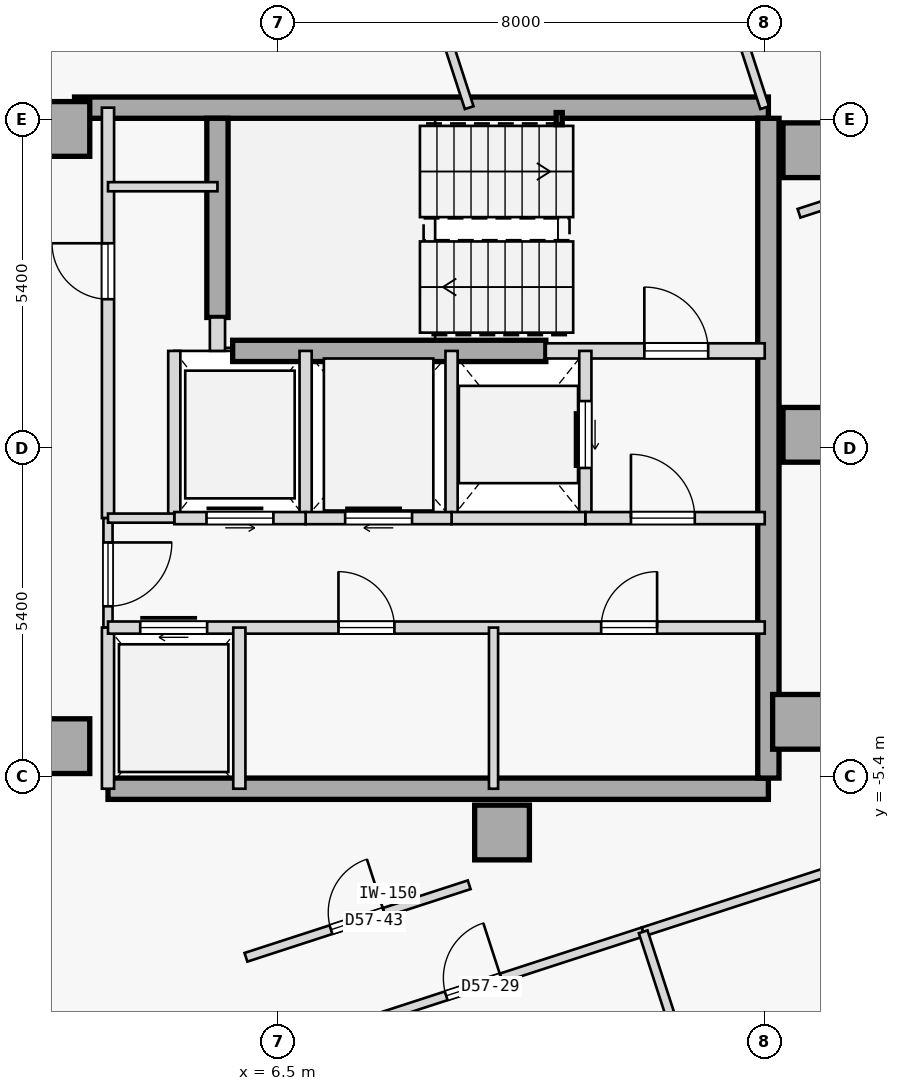
"""IFC4 building model, lengths in metres.
Left out: names, types, materials, properties, quantities, classifications, styles, units other than length and angle.
Written with IfcOpenShell. Run it as: python <this file> out.ifc"""

import sys

from ifc_helpers import new_model, si_unit, direction, frame, frame_2d, origin, origin_2d, place, context, subcontext, project, spatial, rectangle, hollow_rectangle, extrude, element, fill, save


model = new_model("IFC4")
c1 = context("Model", 3, precision=1e-05, world=origin(), true_north=direction((0.0, 1.0)))
c2 = subcontext(c1, "Body", "Model", "MODEL_VIEW")
j1 = project(units=[si_unit("LENGTHUNIT", "METRE"), si_unit("PLANEANGLEUNIT", "RADIAN")], contexts=[c1])
p1 = place(None, origin())
s1 = spatial("IfcSite", under=j1, at=p1, CompositionType="ELEMENT")
p2 = place(p1, origin())
s2 = spatial("IfcBuilding", under=s1, at=p2, CompositionType="ELEMENT")
p3 = place(p2, frame((0.0, 0.0, 217.6)))
s3 = spatial("IfcBuildingStorey", under=s2, at=p3, CompositionType="ELEMENT", Elevation=217.6)
for number, where, z_axis, x_axis in (
    (1, (15.25, 4.9, 0.0), (0.0, 0.0, 1.0), (1.0, 0.0, 0.0)),
    (2, (15.25, 0.22, 0.0), (0.0, 0.0, 1.0), (1.0, 0.0, 0.0)),
    (3, (15.08, -4.5, 0.0), (0.0, 0.0, 1.0), (1.0, 0.0, 0.0)),
    (4, (10.18, -6.32, 0.0), (0.0, 0.0, 1.0), (1.0, 0.0, 0.0)),
    (5, (2.95, -4.9, 0.0), (0.0, 0.0, 1.0), (1.0, 0.0, 0.0)),
    (6, (2.95, 5.25, 0.0), (0.0, 0.0, 1.0), (1.0, 0.0, 0.0)),
):
    element("IfcColumn", number, at=place(p3, frame(where, z_axis=z_axis, x_axis=x_axis)), inside=s3, PredefinedType="COLUMN", context=c2, shape_type="SweptSolid", body=[
        extrude(rectangle(XDim=0.9, YDim=0.9, at=origin_2d()), origin(), (0.0, 0.0, 1.0), 3.35),
    ])
p4 = place(p3, frame((3.15, 5.6, 0.0), z_axis=(0.0, 0.0, 1.0), x_axis=(1.0, 0.0, 0.0)))
e7 = element("IfcWall", 7, at=p4, inside=s3, PredefinedType="SHEAR", context=c2, shape_type="SweptSolid", body=[
    extrude(rectangle(XDim=11.41, YDim=0.35, at=frame_2d((5.705, 0.0))), origin(), (0.0, 0.0, 1.0), 3.125),
])
p5 = place(p3, frame((3.7, -5.6, 0.0), z_axis=(0.0, 0.0, 1.0), x_axis=(1.0, 0.0, 0.0)))
e8 = element("IfcWall", 8, at=p5, inside=s3, PredefinedType="SHEAR", context=c2, shape_type="SweptSolid", body=[
    extrude(rectangle(XDim=10.86, YDim=0.35, at=frame_2d((5.43, 0.0))), origin(), (0.0, 0.0, 1.0), 3.125),
])
p6 = place(p3, frame((14.56, -5.425, 0.0), z_axis=(0.0, 0.0, 1.0), x_axis=(0.0, 1.0, 0.0)))
e9 = element("IfcWall", 9, at=p6, inside=s3, PredefinedType="SHEAR", context=c2, shape_type="SweptSolid", body=[
    extrude(rectangle(XDim=10.85, YDim=0.35, at=frame_2d((5.425, 0.0))), origin(), (0.0, 0.0, 1.0), 3.125),
])
p7 = place(p3, frame((5.5, 2.15, 0.0), z_axis=(0.0, 0.0, 1.0), x_axis=(0.0, 1.0, 0.0)))
e10 = element("IfcWall", 10, at=p7, inside=s3, PredefinedType="SHEAR", context=c2, shape_type="SweptSolid", body=[
    extrude(rectangle(XDim=3.275, YDim=0.35, at=frame_2d((1.638, 0.0))), origin(), (0.0, 0.0, 1.0), 3.125),
])
p8 = place(p3, frame((5.75, 1.6, 0.0), z_axis=(0.0, 0.0, 1.0), x_axis=(1.0, 0.0, 0.0)))
e11 = element("IfcWall", 11, at=p8, inside=s3, PredefinedType="SHEAR", context=c2, shape_type="SweptSolid", body=[
    extrude(rectangle(XDim=5.15, YDim=0.35, at=frame_2d((2.575, 0.0))), origin(), (0.0, 0.0, 1.0), 3.125),
])
p9 = place(p3, frame((11.12, 5.42, 0.0), z_axis=(0.0, 0.0, 1.0), x_axis=(1.0, 0.0, 0.0)))
e12 = element("IfcColumn", 12, at=p9, inside=s3, PredefinedType="COLUMN", context=c2, shape_type="SweptSolid", body=[
    extrude(hollow_rectangle(XDim=0.1, YDim=0.2, WallThickness=0.008, at=origin_2d()), origin(), (0.0, 0.0, 1.0), 3.35),
])
p10 = place(p3, frame((10.9, 1.6, 0.0), z_axis=(0.0, 0.0, 1.0), x_axis=(1.0, 0.0, 0.0)))
e13 = element("IfcWall", 13, at=p10, inside=s3, PredefinedType="STANDARD", context=c2, shape_type="SweptSolid", body=[
    extrude(rectangle(XDim=3.6, YDim=0.25, at=frame_2d((1.8, 0.0))), origin(), (0.0, 0.0, 1.0), 3.125),
])
p11 = place(p10, frame((1.62, 0.0, 0.0)))
e14 = element("IfcOpeningElement", 14, at=p11, cuts=e13, PredefinedType="OPENING", context=c2, shape_type="SweptSolid", body=[
    extrude(rectangle(XDim=1.05, YDim=2.15, at=frame_2d((0.525, 1.075))), frame((0.0, 0.135, 0.0), z_axis=(0.0, -1.0, 0.0), x_axis=(1.0, 0.0, 0.0)), (0.0, 0.0, 1.0), 0.27),
])
p12 = place(p3, frame((5.5, 1.6, 0.0), z_axis=(0.0, 0.0, 1.0), x_axis=(0.0, 1.0, 0.0)))
e15 = element("IfcWall", 15, at=p12, inside=s3, PredefinedType="STANDARD", context=c2, shape_type="SweptSolid", body=[
    extrude(rectangle(XDim=0.55, YDim=0.25, at=frame_2d((0.275, 0.0))), origin(), (0.0, 0.0, 1.0), 3.125),
])
p13 = place(p3, frame((3.7, -1.15, 0.0), z_axis=(0.0, 0.0, 1.0), x_axis=(0.0, 1.0, 0.0)))
e16 = element("IfcWall", 16, at=p13, inside=s3, PredefinedType="STANDARD", context=c2, shape_type="SweptSolid", body=[
    extrude(rectangle(XDim=6.75, YDim=0.2, at=frame_2d((3.375, 0.0))), origin(), (0.0, 0.0, 1.0), 3.125),
])
p14 = place(p13, frame((3.6, 0.0, 0.0)))
e17 = element("IfcOpeningElement", 17, at=p14, cuts=e16, PredefinedType="OPENING", context=c2, shape_type="SweptSolid", body=[
    extrude(rectangle(XDim=0.92, YDim=2.15, at=frame_2d((0.46, 1.075))), frame((0.0, 0.11, 0.0), z_axis=(0.0, -1.0, 0.0), x_axis=(1.0, 0.0, 0.0)), (0.0, 0.0, 1.0), 0.22),
])
p15 = place(p3, frame((3.7, -2.95, 0.0), z_axis=(0.0, 0.0, 1.0), x_axis=(0.0, 1.0, 0.0)))
e18 = element("IfcWall", 18, at=p15, inside=s3, PredefinedType="PARTITIONING", context=c2, shape_type="SweptSolid", body=[
    extrude(rectangle(XDim=1.8, YDim=0.15, at=frame_2d((0.9, 0.0))), origin(), (0.0, 0.0, 1.0), 3.125),
])
p16 = place(p15, frame((0.35, 0.0, 0.0)))
e19 = element("IfcOpeningElement", 19, at=p16, cuts=e18, PredefinedType="OPENING", context=c2, shape_type="SweptSolid", body=[
    extrude(rectangle(XDim=1.05, YDim=2.18, at=frame_2d((0.525, 1.09))), frame((0.0, 0.085, 0.0), z_axis=(0.0, -1.0, 0.0), x_axis=(1.0, 0.0, 0.0)), (0.0, 0.0, 1.0), 0.17),
])
p17 = place(p3, frame((3.7, -5.6, 0.0), z_axis=(0.0, 0.0, 1.0), x_axis=(0.0, 1.0, 0.0)))
e20 = element("IfcWall", 20, at=p17, inside=s3, PredefinedType="STANDARD", context=c2, shape_type="SweptSolid", body=[
    extrude(rectangle(XDim=2.65, YDim=0.2, at=frame_2d((1.325, 0.0))), origin(), (0.0, 0.0, 1.0), 3.125),
])
p18 = place(p3, frame((11.55, -1.15, 0.0), z_axis=(0.0, 0.0, 1.0), x_axis=(0.0, 1.0, 0.0)))
e21 = element("IfcWall", 21, at=p18, inside=s3, PredefinedType="STANDARD", context=c2, shape_type="SweptSolid", body=[
    extrude(rectangle(XDim=2.75, YDim=0.2, at=frame_2d((1.375, 0.0))), origin(), (0.0, 0.0, 1.0), 3.125),
])
p19 = place(p18, frame((0.825, 0.0, 0.0)))
e22 = element("IfcOpeningElement", 22, at=p19, cuts=e21, PredefinedType="OPENING", context=c2, shape_type="SweptSolid", body=[
    extrude(rectangle(XDim=1.1, YDim=2.15, at=frame_2d((0.55, 1.075))), frame((0.0, 0.11, 0.0), z_axis=(0.0, -1.0, 0.0), x_axis=(1.0, 0.0, 0.0)), (0.0, 0.0, 1.0), 0.22),
])
p20 = place(p3, frame((9.35, -1.15, 0.0), z_axis=(0.0, 0.0, 1.0), x_axis=(0.0, 1.0, 0.0)))
e23 = element("IfcWall", 23, at=p20, inside=s3, PredefinedType="STANDARD", context=c2, shape_type="SweptSolid", body=[
    extrude(rectangle(XDim=2.75, YDim=0.2, at=frame_2d((1.375, 0.0))), origin(), (0.0, 0.0, 1.0), 3.125),
])
p21 = place(p3, frame((11.55, -1.15, 0.0), z_axis=(0.0, 0.0, 1.0), x_axis=(1.0, 0.0, 0.0)))
e24 = element("IfcWall", 24, at=p21, inside=s3, PredefinedType="STANDARD", context=c2, shape_type="SweptSolid", body=[
    extrude(rectangle(XDim=2.95, YDim=0.2, at=frame_2d((1.475, 0.0))), origin(), (0.0, 0.0, 1.0), 3.125),
])
p22 = place(p21, frame((0.75, 0.0, 0.0)))
e25 = element("IfcOpeningElement", 25, at=p22, cuts=e24, PredefinedType="OPENING", context=c2, shape_type="SweptSolid", body=[
    extrude(rectangle(XDim=1.05, YDim=2.18, at=frame_2d((0.525, 1.09))), frame((0.0, 0.11, 0.0), z_axis=(0.0, -1.0, 0.0), x_axis=(1.0, 0.0, 0.0)), (0.0, 0.0, 1.0), 0.22),
])
p23 = place(p3, frame((9.35, -1.15, 0.0), z_axis=(0.0, 0.0, 1.0), x_axis=(1.0, 0.0, 0.0)))
e26 = element("IfcWall", 26, at=p23, inside=s3, PredefinedType="STANDARD", context=c2, shape_type="SweptSolid", body=[
    extrude(rectangle(XDim=2.2, YDim=0.2, at=frame_2d((1.1, 0.0))), origin(), (0.0, 0.0, 1.0), 3.125),
])
p24 = place(p3, frame((6.95, -1.15, 0.0), z_axis=(0.0, 0.0, 1.0), x_axis=(0.0, 1.0, 0.0)))
e27 = element("IfcWall", 27, at=p24, inside=s3, PredefinedType="STANDARD", context=c2, shape_type="SweptSolid", body=[
    extrude(rectangle(XDim=2.75, YDim=0.2, at=frame_2d((1.375, 0.0))), origin(), (0.0, 0.0, 1.0), 3.125),
])
p25 = place(p3, frame((6.95, -1.15, 0.0), z_axis=(0.0, 0.0, 1.0), x_axis=(1.0, 0.0, 0.0)))
e28 = element("IfcWall", 28, at=p25, inside=s3, PredefinedType="STANDARD", context=c2, shape_type="SweptSolid", body=[
    extrude(rectangle(XDim=2.4, YDim=0.2, at=frame_2d((1.2, 0.0))), origin(), (0.0, 0.0, 1.0), 3.125),
])
p26 = place(p25, frame((0.65, 0.0, 0.0)))
e29 = element("IfcOpeningElement", 29, at=p26, cuts=e28, PredefinedType="OPENING", context=c2, shape_type="SweptSolid", body=[
    extrude(rectangle(XDim=1.1, YDim=2.15, at=frame_2d((0.55, 1.075))), frame((0.0, 0.11, 0.0), z_axis=(0.0, -1.0, 0.0), x_axis=(1.0, 0.0, 0.0)), (0.0, 0.0, 1.0), 0.22),
])
p27 = place(p3, frame((4.79, -1.15, 0.0), z_axis=(0.0, 0.0, 1.0), x_axis=(0.0, 1.0, 0.0)))
e30 = element("IfcWall", 30, at=p27, inside=s3, PredefinedType="STANDARD", context=c2, shape_type="SweptSolid", body=[
    extrude(rectangle(XDim=2.75, YDim=0.2, at=frame_2d((1.375, 0.0))), origin(), (0.0, 0.0, 1.0), 3.125),
])
p28 = place(p3, frame((4.79, -1.15, 0.0), z_axis=(0.0, 0.0, 1.0), x_axis=(1.0, 0.0, 0.0)))
e31 = element("IfcWall", 31, at=p28, inside=s3, PredefinedType="STANDARD", context=c2, shape_type="SweptSolid", body=[
    extrude(rectangle(XDim=2.16, YDim=0.2, at=frame_2d((1.08, 0.0))), origin(), (0.0, 0.0, 1.0), 3.125),
])
p29 = place(p28, frame((0.53, 0.0, 0.0)))
e32 = element("IfcOpeningElement", 32, at=p29, cuts=e31, PredefinedType="OPENING", context=c2, shape_type="SweptSolid", body=[
    extrude(rectangle(XDim=1.1, YDim=2.15, at=frame_2d((0.55, 1.075))), frame((0.0, 0.11, 0.0), z_axis=(0.0, -1.0, 0.0), x_axis=(1.0, 0.0, 0.0)), (0.0, 0.0, 1.0), 0.22),
])
p30 = place(p3, frame((3.7, -1.15, 0.0), z_axis=(0.0, 0.0, 1.0), x_axis=(1.0, 0.0, 0.0)))
e33 = element("IfcWall", 33, at=p30, inside=s3, PredefinedType="PARTITIONING", context=c2, shape_type="SweptSolid", body=[
    extrude(rectangle(XDim=1.09, YDim=0.15, at=frame_2d((0.545, 0.0))), origin(), (0.0, 0.0, 1.0), 3.125),
])
p31 = place(p3, frame((3.7, -2.95, 0.0), z_axis=(0.0, 0.0, 1.0), x_axis=(1.0, 0.0, 0.0)))
e34 = element("IfcWall", 34, at=p31, inside=s3, PredefinedType="STANDARD", context=c2, shape_type="SweptSolid", body=[
    extrude(rectangle(XDim=10.8, YDim=0.2, at=frame_2d((5.4, 0.0))), origin(), (0.0, 0.0, 1.0), 3.125),
])
p32 = place(p31, frame((0.53, 0.0, 0.0)))
e35 = element("IfcOpeningElement", 35, at=p32, cuts=e34, PredefinedType="OPENING", context=c2, shape_type="SweptSolid", body=[
    extrude(rectangle(XDim=1.1, YDim=2.15, at=frame_2d((0.55, 1.075))), frame((0.0, 0.11, 0.0), z_axis=(0.0, -1.0, 0.0), x_axis=(1.0, 0.0, 0.0)), (0.0, 0.0, 1.0), 0.22),
])
p33 = place(p31, frame((3.79, 0.0, 0.0)))
e36 = element("IfcOpeningElement", 36, at=p33, cuts=e34, PredefinedType="OPENING", context=c2, shape_type="SweptSolid", body=[
    extrude(rectangle(XDim=0.92, YDim=2.15, at=frame_2d((0.46, 1.075))), frame((0.0, 0.11, 0.0), z_axis=(0.0, -1.0, 0.0), x_axis=(1.0, 0.0, 0.0)), (0.0, 0.0, 1.0), 0.22),
])
p34 = place(p31, frame((8.11, 0.0, 0.0)))
e37 = element("IfcOpeningElement", 37, at=p34, cuts=e34, PredefinedType="OPENING", context=c2, shape_type="SweptSolid", body=[
    extrude(rectangle(XDim=0.92, YDim=2.15, at=frame_2d((0.46, 1.075))), frame((0.0, 0.11, 0.0), z_axis=(0.0, -1.0, 0.0), x_axis=(1.0, 0.0, 0.0)), (0.0, 0.0, 1.0), 0.22),
])
p35 = place(p3, frame((5.86, -5.6, 0.0), z_axis=(0.0, 0.0, 1.0), x_axis=(0.0, 1.0, 0.0)))
e38 = element("IfcWall", 38, at=p35, inside=s3, PredefinedType="STANDARD", context=c2, shape_type="SweptSolid", body=[
    extrude(rectangle(XDim=2.65, YDim=0.2, at=frame_2d((1.325, 0.0))), origin(), (0.0, 0.0, 1.0), 3.125),
])
p36 = place(p3, frame((10.04, -5.6, 0.0), z_axis=(0.0, 0.0, 1.0), x_axis=(0.0, 1.0, 0.0)))
e39 = element("IfcWall", 39, at=p36, inside=s3, PredefinedType="PARTITIONING", context=c2, shape_type="SweptSolid", body=[
    extrude(rectangle(XDim=2.65, YDim=0.15, at=frame_2d((1.325, 0.0))), origin(), (0.0, 0.0, 1.0), 3.125),
])
p37 = place(p3, frame((3.7, 4.3, 0.0), z_axis=(0.0, 0.0, 1.0), x_axis=(1.0, 0.0, 0.0)))
e40 = element("IfcWall", 40, at=p37, inside=s3, PredefinedType="PARTITIONING", context=c2, shape_type="SweptSolid", body=[
    extrude(rectangle(XDim=1.8, YDim=0.15, at=frame_2d((0.9, 0.0))), origin(), (0.0, 0.0, 1.0), 3.125),
])
p38 = place(p3, frame((6.926, -9.765, 0.0), z_axis=(0.0, 0.0, 1.0), x_axis=(0.951054878391, 0.30902203528, 0.0)))
e41 = element("IfcWall", 41, at=p38, inside=s3, PredefinedType="PARTITIONING", context=c2, shape_type="SweptSolid", body=[
    extrude(rectangle(XDim=5.862, YDim=0.15, at=frame_2d((2.931, 0.0))), origin(), (0.0, 0.0, 1.0), 3.125),
])
p39 = place(p38, frame((2.456, 0.0, 0.0)))
e42 = element("IfcOpeningElement", 42, at=p39, cuts=e41, PredefinedType="OPENING", context=c2, shape_type="SweptSolid", body=[
    extrude(rectangle(XDim=0.95, YDim=2.15, at=frame_2d((0.475, 1.075))), frame((0.0, 0.085, 0.0), z_axis=(0.0, -1.0, 0.0), x_axis=(1.0, 0.0, 0.0)), (0.0, 0.0, 1.0), 0.17),
])
p40 = place(p3, frame((12.501, -7.953, 0.0), z_axis=(0.0, 0.0, 1.0), x_axis=(0.951046103464, 0.309049039936, 0.0)))
e43 = element("IfcWall", 43, at=p40, inside=s3, PredefinedType="PARTITIONING", context=c2, shape_type="SweptSolid", body=[
    extrude(rectangle(XDim=4.025, YDim=0.15, at=frame_2d((2.012, 0.0))), origin(), (0.0, 0.0, 1.0), 3.125),
])
p41 = place(p3, frame((5.969, -8.372, 0.0), z_axis=(0.0, 0.0, 1.0), x_axis=(0.951053123415, 0.309027436391, 0.0)))
e44 = element("IfcWall", 44, at=p41, inside=s3, PredefinedType="PARTITIONING", context=c2, shape_type="SweptSolid", body=[
    extrude(rectangle(XDim=3.86, YDim=0.15, at=frame_2d((1.93, 0.0))), origin(), (0.0, 0.0, 1.0), 3.125),
])
p42 = place(p41, frame((1.47, 0.0, 0.0)))
e45 = element("IfcOpeningElement", 45, at=p42, cuts=e44, PredefinedType="OPENING", context=c2, shape_type="SweptSolid", body=[
    extrude(rectangle(XDim=0.92, YDim=2.15, at=frame_2d((0.46, 1.075))), frame((0.0, 0.085, 0.0), z_axis=(0.0, -1.0, 0.0), x_axis=(1.0, 0.0, 0.0)), (0.0, 0.0, 1.0), 0.17),
])
p43 = place(p3, frame((15.548, -17.333, 0.0), z_axis=(0.0, 0.0, 1.0), x_axis=(-0.308999867152, 0.951062081097, 0.0)))
e46 = element("IfcWall", 46, at=p43, inside=s3, PredefinedType="PARTITIONING", context=c2, shape_type="SweptSolid", body=[
    extrude(rectangle(XDim=9.862, YDim=0.15, at=frame_2d((4.931, 0.0))), origin(), (0.0, 0.0, 1.0), 3.125),
])
p44 = place(p3, frame((9.64, 5.6, 0.0), z_axis=(0.0, 0.0, 1.0), x_axis=(-0.309012069377, 0.95105811651, 0.0)))
e47 = element("IfcWall", 47, at=p44, inside=s3, PredefinedType="PARTITIONING", context=c2, shape_type="SweptSolid", body=[
    extrude(rectangle(XDim=7.46, YDim=0.15, at=frame_2d((3.73, 0.0))), origin(), (0.0, 0.0, 1.0), 3.125),
])
p45 = place(p3, frame((14.5, 5.6, 0.0), z_axis=(0.0, 0.0, 1.0), x_axis=(-0.308974360462, 0.951070367837, 0.0)))
e48 = element("IfcWall", 48, at=p45, inside=s3, PredefinedType="PARTITIONING", context=c2, shape_type="SweptSolid", body=[
    extrude(rectangle(XDim=4.843, YDim=0.15, at=frame_2d((2.421, 0.0))), origin(), (0.0, 0.0, 1.0), 3.125),
])
p46 = place(p3, frame((15.064, 3.863, 0.0), z_axis=(0.0, 0.0, 1.0), x_axis=(0.951061448945, 0.309001812827, 0.0)))
e49 = element("IfcWall", 49, at=p46, inside=s3, PredefinedType="PARTITIONING", context=c2, shape_type="SweptSolid", body=[
    extrude(rectangle(XDim=10.352, YDim=0.15, at=frame_2d((5.176, 0.0))), origin(), (0.0, 0.0, 1.0), 3.125),
])
p47 = place(p46, frame((4.716, 0.0, 0.0)))
e50 = element("IfcOpeningElement", 50, at=p47, cuts=e49, PredefinedType="OPENING", context=c2, shape_type="SweptSolid", body=[
    extrude(rectangle(XDim=0.92, YDim=2.15, at=frame_2d((0.46, 1.075))), frame((0.0, 0.085, 0.0), z_axis=(0.0, -1.0, 0.0), x_axis=(1.0, 0.0, 0.0)), (0.0, 0.0, 1.0), 0.17),
])
p48 = place(p11, origin())
e51 = element("IfcDoor", 51, at=p48, inside=s3, OperationType="SINGLE_SWING_LEFT", PredefinedType="DOOR", context=c2, shape_type="SweptSolid", body=[
    extrude(rectangle(XDim=1.05, YDim=2.15, at=frame_2d((0.525, 1.075))), frame((0.0, 0.025, 0.0), z_axis=(0.0, -1.0, 0.0), x_axis=(1.0, 0.0, 0.0)), (0.0, 0.0, 1.0), 0.05),
])
fill(e14, e51)
p49 = place(p22, origin())
e52 = element("IfcDoor", 52, at=p49, inside=s3, OperationType="SINGLE_SWING_LEFT", PredefinedType="DOOR", context=c2, shape_type="SweptSolid", body=[
    extrude(rectangle(XDim=1.05, YDim=2.18, at=frame_2d((0.525, 1.09))), frame((0.0, 0.025, 0.0), z_axis=(0.0, -1.0, 0.0), x_axis=(1.0, 0.0, 0.0)), (0.0, 0.0, 1.0), 0.05),
])
fill(e25, e52)
p50 = place(p16, frame((1.05, 0.0, 0.0), z_axis=(0.0, 0.0, 1.0), x_axis=(-1.0, 0.0, 0.0)))
e53 = element("IfcDoor", 53, at=p50, inside=s3, OperationType="SINGLE_SWING_RIGHT", PredefinedType="DOOR", context=c2, shape_type="SweptSolid", body=[
    extrude(rectangle(XDim=1.05, YDim=2.18, at=frame_2d((0.525, 1.09))), frame((0.0, 0.025, 0.0), z_axis=(0.0, -1.0, 0.0), x_axis=(1.0, 0.0, 0.0)), (0.0, 0.0, 1.0), 0.05),
])
fill(e19, e53)
p51 = place(p19, origin())
e54 = element("IfcDoor", 54, at=p51, inside=s3, OperationType="SLIDING_TO_RIGHT", PredefinedType="DOOR", context=c2, shape_type="SweptSolid", body=[
    extrude(rectangle(XDim=1.1, YDim=2.15, at=frame_2d((0.55, 1.075))), frame((0.0, 0.025, 0.0), z_axis=(0.0, -1.0, 0.0), x_axis=(1.0, 0.0, 0.0)), (0.0, 0.0, 1.0), 0.05),
])
fill(e22, e54)
p52 = place(p26, origin())
e55 = element("IfcDoor", 55, at=p52, inside=s3, OperationType="SLIDING_TO_RIGHT", PredefinedType="DOOR", context=c2, shape_type="SweptSolid", body=[
    extrude(rectangle(XDim=1.1, YDim=2.15, at=frame_2d((0.55, 1.075))), frame((0.0, 0.025, 0.0), z_axis=(0.0, -1.0, 0.0), x_axis=(1.0, 0.0, 0.0)), (0.0, 0.0, 1.0), 0.05),
])
fill(e29, e55)
p53 = place(p29, origin())
e56 = element("IfcDoor", 56, at=p53, inside=s3, OperationType="SLIDING_TO_LEFT", PredefinedType="DOOR", context=c2, shape_type="SweptSolid", body=[
    extrude(rectangle(XDim=1.1, YDim=2.15, at=frame_2d((0.55, 1.075))), frame((0.0, 0.025, 0.0), z_axis=(0.0, -1.0, 0.0), x_axis=(1.0, 0.0, 0.0)), (0.0, 0.0, 1.0), 0.05),
])
fill(e32, e56)
p54 = place(p32, origin())
e57 = element("IfcDoor", 57, at=p54, inside=s3, OperationType="SLIDING_TO_RIGHT", PredefinedType="DOOR", context=c2, shape_type="SweptSolid", body=[
    extrude(rectangle(XDim=1.1, YDim=2.15, at=frame_2d((0.55, 1.075))), frame((0.0, 0.025, 0.0), z_axis=(0.0, -1.0, 0.0), x_axis=(1.0, 0.0, 0.0)), (0.0, 0.0, 1.0), 0.05),
])
fill(e35, e57)
p55 = place(p33, origin())
e58 = element("IfcDoor", 58, at=p55, inside=s3, OperationType="SINGLE_SWING_LEFT", PredefinedType="DOOR", context=c2, shape_type="SweptSolid", body=[
    extrude(rectangle(XDim=0.92, YDim=2.15, at=frame_2d((0.46, 1.075))), frame((0.0, 0.025, 0.0), z_axis=(0.0, -1.0, 0.0), x_axis=(1.0, 0.0, 0.0)), (0.0, 0.0, 1.0), 0.05),
])
fill(e36, e58)
p56 = place(p34, origin())
e59 = element("IfcDoor", 59, at=p56, inside=s3, OperationType="SINGLE_SWING_RIGHT", PredefinedType="DOOR", context=c2, shape_type="SweptSolid", body=[
    extrude(rectangle(XDim=0.92, YDim=2.15, at=frame_2d((0.46, 1.075))), frame((0.0, 0.025, 0.0), z_axis=(0.0, -1.0, 0.0), x_axis=(1.0, 0.0, 0.0)), (0.0, 0.0, 1.0), 0.05),
])
fill(e37, e59)
p57 = place(p14, origin())
e60 = element("IfcDoor", 60, at=p57, inside=s3, OperationType="SINGLE_SWING_RIGHT", PredefinedType="DOOR", context=c2, shape_type="SweptSolid", body=[
    extrude(rectangle(XDim=0.92, YDim=2.15, at=frame_2d((0.46, 1.075))), frame((0.0, 0.025, 0.0), z_axis=(0.0, -1.0, 0.0), x_axis=(1.0, 0.0, 0.0)), (0.0, 0.0, 1.0), 0.05),
])
fill(e17, e60)
p58 = place(p39, origin())
e61 = element("IfcDoor", 61, at=p58, inside=s3, OperationType="SINGLE_SWING_RIGHT", PredefinedType="DOOR", context=c2, shape_type="SweptSolid", body=[
    extrude(rectangle(XDim=0.95, YDim=2.15, at=frame_2d((0.475, 1.075))), frame((0.0, 0.025, 0.0), z_axis=(0.0, -1.0, 0.0), x_axis=(1.0, 0.0, 0.0)), (0.0, 0.0, 1.0), 0.05),
])
fill(e42, e61)
p59 = place(p42, origin())
e62 = element("IfcDoor", 62, at=p59, inside=s3, OperationType="SINGLE_SWING_RIGHT", PredefinedType="DOOR", context=c2, shape_type="SweptSolid", body=[
    extrude(rectangle(XDim=0.92, YDim=2.15, at=frame_2d((0.46, 1.075))), frame((0.0, 0.025, 0.0), z_axis=(0.0, -1.0, 0.0), x_axis=(1.0, 0.0, 0.0)), (0.0, 0.0, 1.0), 0.05),
])
fill(e45, e62)
save(model, sys.argv[1])
